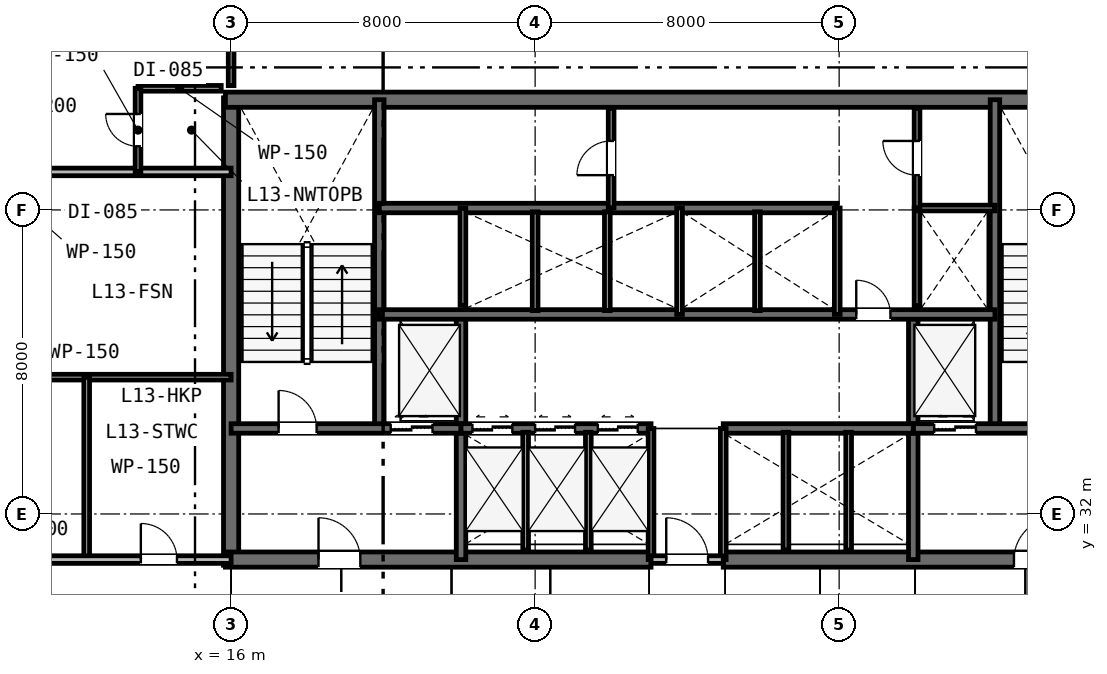
"""IFC4 building model, lengths in metres.
Left out: names, types, materials, properties, quantities, classifications, styles, units other than length and angle.
Written with IfcOpenShell. Run it as: python <this file> out.ifc"""

import sys

from ifc_helpers import new_model, si_unit, direction, frame, frame_2d, origin, place, context, subcontext, project, spatial, rectangle, extrude, element, fill, save


model = new_model("IFC4")
c1 = context("Model", 3, precision=1e-05, world=origin(), true_north=direction((0.0, 1.0)))
c2 = subcontext(c1, "Body", "Model", "MODEL_VIEW")
j1 = project(units=[si_unit("LENGTHUNIT", "METRE"), si_unit("PLANEANGLEUNIT", "RADIAN")], contexts=[c1])
p1 = place(None, origin())
s1 = spatial("IfcSite", under=j1, at=p1, CompositionType="ELEMENT")
p2 = place(p1, origin())
s2 = spatial("IfcBuilding", under=s1, at=p2, CompositionType="ELEMENT")
p3 = place(p2, frame((0.0, 0.0, 54.6)))
s3 = spatial("IfcBuildingStorey", under=s2, at=p3, CompositionType="ELEMENT", Elevation=54.6)
p4 = place(p3, frame((16.0, 30.65, 0.0), z_axis=(0.0, 0.0, 1.0), x_axis=(0.0, 1.0, 0.0)))
e1 = element("IfcWall", 1, at=p4, inside=s3, PredefinedType="SHEAR", context=c2, shape_type="SweptSolid", body=[
    extrude(rectangle(XDim=12.3, YDim=0.4, at=frame_2d((6.15, 0.0))), origin(), (0.0, 0.0, 1.0), 3.6),
])
p5 = place(p3, frame((15.85, 42.9, 0.0), z_axis=(0.0, 0.0, 1.0), x_axis=(1.0, 0.0, 0.0)))
e2 = element("IfcWall", 2, at=p5, inside=s3, PredefinedType="SHEAR", context=c2, shape_type="SweptSolid", body=[
    extrude(rectangle(XDim=24.3, YDim=0.4, at=frame_2d((12.15, 0.0))), origin(), (0.0, 0.0, 1.0), 3.6),
])
p6 = place(p3, frame((15.85, 30.8, 0.0), z_axis=(0.0, 0.0, 1.0), x_axis=(1.0, 0.0, 0.0)))
e3 = element("IfcWall", 3, at=p6, inside=s3, PredefinedType="SHEAR", context=c2, shape_type="SweptSolid", body=[
    extrude(rectangle(XDim=11.2, YDim=0.4, at=frame_2d((5.6, 0.0))), origin(), (0.0, 0.0, 1.0), 3.6),
])
p7 = place(p6, frame((2.45, 0.0, 0.0)))
e4 = element("IfcOpeningElement", 4, at=p7, cuts=e3, PredefinedType="OPENING", context=c2, shape_type="SweptSolid", body=[
    extrude(rectangle(XDim=1.1, YDim=2.15, at=frame_2d((0.55, 1.075))), frame((0.0, 0.21, 0.0), z_axis=(0.0, -1.0, 0.0), x_axis=(1.0, 0.0, 0.0)), (0.0, 0.0, 1.0), 0.42),
])
p8 = place(p3, frame((28.95, 30.8, 0.0), z_axis=(0.0, 0.0, 1.0), x_axis=(1.0, 0.0, 0.0)))
e5 = element("IfcWall", 5, at=p8, inside=s3, PredefinedType="SHEAR", context=c2, shape_type="SweptSolid", body=[
    extrude(rectangle(XDim=11.2, YDim=0.4, at=frame_2d((5.6, 0.0))), origin(), (0.0, 0.0, 1.0), 3.6),
])
p9 = place(p8, frame((7.65, 0.0, 0.0)))
e6 = element("IfcOpeningElement", 6, at=p9, cuts=e5, PredefinedType="OPENING", context=c2, shape_type="SweptSolid", body=[
    extrude(rectangle(XDim=1.1, YDim=2.15, at=frame_2d((0.55, 1.075))), frame((0.0, 0.21, 0.0), z_axis=(0.0, -1.0, 0.0), x_axis=(1.0, 0.0, 0.0)), (0.0, 0.0, 1.0), 0.42),
])
for number, where, z_axis, x_axis in (
    (7, (19.9, 34.25, 0.0), (0.0, 0.0, 1.0), (0.0, 1.0, 0.0)),
    (8, (36.1, 34.25, 0.0), (0.0, 0.0, 1.0), (0.0, 1.0, 0.0)),
):
    element("IfcWall", number, at=place(p3, frame(where, z_axis=z_axis, x_axis=x_axis)), inside=s3, PredefinedType="SHEAR", context=c2, shape_type="SweptSolid", body=[
        extrude(rectangle(XDim=8.65, YDim=0.25, at=frame_2d((4.325, 0.0))), origin(), (0.0, 0.0, 1.0), 3.6),
    ])
for number, where, z_axis, x_axis in (
    (9, (22.05, 30.8, 0.0), (0.0, 0.0, 1.0), (0.0, 1.0, 0.0)),
    (10, (33.95, 30.8, 0.0), (0.0, 0.0, 1.0), (0.0, 1.0, 0.0)),
):
    element("IfcWall", number, at=place(p3, frame(where, z_axis=z_axis, x_axis=x_axis)), inside=s3, PredefinedType="SHEAR", context=c2, shape_type="SweptSolid", body=[
        extrude(rectangle(XDim=6.45, YDim=0.25, at=frame_2d((3.225, 0.0))), origin(), (0.0, 0.0, 1.0), 3.6),
    ])
p10 = place(p3, frame((16.0, 34.25, 0.0), z_axis=(0.0, 0.0, 1.0), x_axis=(1.0, 0.0, 0.0)))
e11 = element("IfcWall", 11, at=p10, inside=s3, PredefinedType="SHEAR", context=c2, shape_type="SweptSolid", body=[
    extrude(rectangle(XDim=6.05, YDim=0.25, at=frame_2d((3.025, 0.0))), origin(), (0.0, 0.0, 1.0), 3.6),
])
p11 = place(p10, frame((1.25, 0.0, 0.0)))
e12 = element("IfcOpeningElement", 12, at=p11, cuts=e11, PredefinedType="OPENING", context=c2, shape_type="SweptSolid", body=[
    extrude(rectangle(XDim=1.0, YDim=2.15, at=frame_2d((0.5, 1.075))), frame((0.0, 0.135, 0.0), z_axis=(0.0, -1.0, 0.0), x_axis=(1.0, 0.0, 0.0)), (0.0, 0.0, 1.0), 0.27),
])
p12 = place(p10, frame((4.2, 0.0, 0.0)))
e13 = element("IfcOpeningElement", 13, at=p12, cuts=e11, PredefinedType="OPENING", context=c2, shape_type="SweptSolid", body=[
    extrude(rectangle(XDim=1.1, YDim=2.15, at=frame_2d((0.55, 1.075))), frame((0.0, 0.135, 0.0), z_axis=(0.0, -1.0, 0.0), x_axis=(1.0, 0.0, 0.0)), (0.0, 0.0, 1.0), 0.27),
])
p13 = place(p3, frame((33.95, 34.25, 0.0), z_axis=(0.0, 0.0, 1.0), x_axis=(1.0, 0.0, 0.0)))
e14 = element("IfcWall", 14, at=p13, inside=s3, PredefinedType="SHEAR", context=c2, shape_type="SweptSolid", body=[
    extrude(rectangle(XDim=6.05, YDim=0.25, at=frame_2d((3.025, 0.0))), origin(), (0.0, 0.0, 1.0), 3.6),
])
p14 = place(p13, frame((3.7, 0.0, 0.0)))
e15 = element("IfcOpeningElement", 15, at=p14, cuts=e14, PredefinedType="OPENING", context=c2, shape_type="SweptSolid", body=[
    extrude(rectangle(XDim=1.0, YDim=2.15, at=frame_2d((0.5, 1.075))), frame((0.0, 0.135, 0.0), z_axis=(0.0, -1.0, 0.0), x_axis=(1.0, 0.0, 0.0)), (0.0, 0.0, 1.0), 0.27),
])
p15 = place(p13, frame((0.55, 0.0, 0.0)))
e16 = element("IfcOpeningElement", 16, at=p15, cuts=e14, PredefinedType="OPENING", context=c2, shape_type="SweptSolid", body=[
    extrude(rectangle(XDim=1.1, YDim=2.15, at=frame_2d((0.55, 1.075))), frame((0.0, 0.135, 0.0), z_axis=(0.0, -1.0, 0.0), x_axis=(1.0, 0.0, 0.0)), (0.0, 0.0, 1.0), 0.27),
])
p16 = place(p3, frame((22.05, 34.25, 0.0), z_axis=(0.0, 0.0, 1.0), x_axis=(1.0, 0.0, 0.0)))
e17 = element("IfcWall", 17, at=p16, inside=s3, PredefinedType="SHEAR", context=c2, shape_type="SweptSolid", body=[
    extrude(rectangle(XDim=5.0, YDim=0.25, at=frame_2d((2.5, 0.0))), origin(), (0.0, 0.0, 1.0), 3.6),
])
p17 = place(p16, frame((0.3, 0.0, 0.0)))
e18 = element("IfcOpeningElement", 18, at=p17, cuts=e17, PredefinedType="OPENING", context=c2, shape_type="SweptSolid", body=[
    extrude(rectangle(XDim=1.05, YDim=2.15, at=frame_2d((0.525, 1.075))), frame((0.0, 0.135, 0.0), z_axis=(0.0, -1.0, 0.0), x_axis=(1.0, 0.0, 0.0)), (0.0, 0.0, 1.0), 0.27),
])
p18 = place(p16, frame((1.95, 0.0, 0.0)))
e19 = element("IfcOpeningElement", 19, at=p18, cuts=e17, PredefinedType="OPENING", context=c2, shape_type="SweptSolid", body=[
    extrude(rectangle(XDim=1.05, YDim=2.15, at=frame_2d((0.525, 1.075))), frame((0.0, 0.135, 0.0), z_axis=(0.0, -1.0, 0.0), x_axis=(1.0, 0.0, 0.0)), (0.0, 0.0, 1.0), 0.27),
])
p19 = place(p16, frame((3.6, 0.0, 0.0)))
e20 = element("IfcOpeningElement", 20, at=p19, cuts=e17, PredefinedType="OPENING", context=c2, shape_type="SweptSolid", body=[
    extrude(rectangle(XDim=1.05, YDim=2.15, at=frame_2d((0.525, 1.075))), frame((0.0, 0.135, 0.0), z_axis=(0.0, -1.0, 0.0), x_axis=(1.0, 0.0, 0.0)), (0.0, 0.0, 1.0), 0.27),
])
p20 = place(p3, frame((28.95, 34.25, 0.0), z_axis=(0.0, 0.0, 1.0), x_axis=(1.0, 0.0, 0.0)))
e21 = element("IfcWall", 21, at=p20, inside=s3, PredefinedType="SHEAR", context=c2, shape_type="SweptSolid", body=[
    extrude(rectangle(XDim=5.0, YDim=0.25, at=frame_2d((2.5, 0.0))), origin(), (0.0, 0.0, 1.0), 3.6),
])
p21 = place(p3, frame((19.9, 37.25, 0.0), z_axis=(0.0, 0.0, 1.0), x_axis=(1.0, 0.0, 0.0)))
e22 = element("IfcWall", 22, at=p21, inside=s3, PredefinedType="SHEAR", context=c2, shape_type="SweptSolid", body=[
    extrude(rectangle(XDim=16.2, YDim=0.25, at=frame_2d((8.1, 0.0))), origin(), (0.0, 0.0, 1.0), 3.6),
])
p22 = place(p21, frame((12.55, 0.0, 0.0)))
e23 = element("IfcOpeningElement", 23, at=p22, cuts=e22, PredefinedType="OPENING", context=c2, shape_type="SweptSolid", body=[
    extrude(rectangle(XDim=0.9, YDim=2.15, at=frame_2d((0.45, 1.075))), frame((0.0, 0.135, 0.0), z_axis=(0.0, -1.0, 0.0), x_axis=(1.0, 0.0, 0.0)), (0.0, 0.0, 1.0), 0.27),
])
p23 = place(p3, frame((19.9, 40.05, 0.0), z_axis=(0.0, 0.0, 1.0), x_axis=(1.0, 0.0, 0.0)))
e24 = element("IfcWall", 24, at=p23, inside=s3, PredefinedType="SHEAR", context=c2, shape_type="SweptSolid", body=[
    extrude(rectangle(XDim=12.05, YDim=0.25, at=frame_2d((6.025, 0.0))), origin(), (0.0, 0.0, 1.0), 3.6),
])
for number, where, z_axis, x_axis in (
    (25, (27.05, 30.8, 0.0), (0.0, 0.0, 1.0), (0.0, 1.0, 0.0)),
    (26, (28.95, 30.8, 0.0), (0.0, 0.0, 1.0), (0.0, 1.0, 0.0)),
):
    element("IfcWall", number, at=place(p3, frame(where, z_axis=z_axis, x_axis=x_axis)), inside=s3, PredefinedType="PLUMBINGWALL", context=c2, shape_type="SweptSolid", body=[
        extrude(rectangle(XDim=3.45, YDim=0.15, at=frame_2d((1.725, 0.0))), origin(), (0.0, 0.0, 1.0), 3.33),
    ])
p24 = place(p3, frame((27.05, 30.8, 0.0), z_axis=(0.0, 0.0, 1.0), x_axis=(1.0, 0.0, 0.0)))
e27 = element("IfcWall", 27, at=p24, inside=s3, PredefinedType="PARTITIONING", context=c2, shape_type="SweptSolid", body=[
    extrude(rectangle(XDim=1.9, YDim=0.2, at=frame_2d((0.95, 0.0))), origin(), (0.0, 0.0, 1.0), 3.33),
])
p25 = place(p24, frame((0.4, 0.0, 0.0)))
e28 = element("IfcOpeningElement", 28, at=p25, cuts=e27, PredefinedType="OPENING", context=c2, shape_type="SweptSolid", body=[
    extrude(rectangle(XDim=1.1, YDim=2.15, at=frame_2d((0.55, 1.075))), frame((0.0, 0.11, 0.0), z_axis=(0.0, -1.0, 0.0), x_axis=(1.0, 0.0, 0.0)), (0.0, 0.0, 1.0), 0.22),
])
for number, where, z_axis, x_axis in (
    (29, (23.75, 31.05, 0.0), (0.0, 0.0, 1.0), (0.0, 1.0, 0.0)),
    (30, (25.4, 31.05, 0.0), (0.0, 0.0, 1.0), (0.0, 1.0, 0.0)),
    (31, (30.6, 31.05, 0.0), (0.0, 0.0, 1.0), (0.0, 1.0, 0.0)),
    (32, (32.25, 31.05, 0.0), (0.0, 0.0, 1.0), (0.0, 1.0, 0.0)),
):
    element("IfcWall", number, at=place(p3, frame(where, z_axis=z_axis, x_axis=x_axis)), inside=s3, PredefinedType="PLUMBINGWALL", context=c2, shape_type="SweptSolid", body=[
        extrude(rectangle(XDim=3.1, YDim=0.15, at=frame_2d((1.55, 0.0))), origin(), (0.0, 0.0, 1.0), 3.33),
    ])
p26 = place(p3, frame((22.1, 37.49, 0.0), z_axis=(0.0, 0.0, 1.0), x_axis=(0.0, 1.0, 0.0)))
e33 = element("IfcWall", 33, at=p26, inside=s3, PredefinedType="PLUMBINGWALL", context=c2, shape_type="SweptSolid", body=[
    extrude(rectangle(XDim=2.56, YDim=0.15, at=frame_2d((1.28, 0.0))), origin(), (0.0, 0.0, 1.0), 3.33),
])
p27 = place(p3, frame((27.8, 37.25, 0.0), z_axis=(0.0, 0.0, 1.0), x_axis=(0.0, 1.0, 0.0)))
e34 = element("IfcWall", 34, at=p27, inside=s3, PredefinedType="PLUMBINGWALL", context=c2, shape_type="SweptSolid", body=[
    extrude(rectangle(XDim=2.8, YDim=0.15, at=frame_2d((1.4, 0.0))), origin(), (0.0, 0.0, 1.0), 3.33),
])
for number, where, z_axis, x_axis in (
    (35, (24.0, 37.35, 0.0), (0.0, 0.0, 1.0), (0.0, 1.0, 0.0)),
    (36, (25.9, 37.35, 0.0), (0.0, 0.0, 1.0), (0.0, 1.0, 0.0)),
):
    element("IfcWall", number, at=place(p3, frame(where, z_axis=z_axis, x_axis=x_axis)), inside=s3, PredefinedType="PLUMBINGWALL", context=c2, shape_type="SweptSolid", body=[
        extrude(rectangle(XDim=2.6, YDim=0.15, at=frame_2d((1.3, 0.0))), origin(), (0.0, 0.0, 1.0), 3.33),
    ])
p28 = place(p3, frame((31.95, 37.25, 0.0), z_axis=(0.0, 0.0, 1.0), x_axis=(0.0, 1.0, 0.0)))
e37 = element("IfcWall", 37, at=p28, inside=s3, PredefinedType="PLUMBINGWALL", context=c2, shape_type="SweptSolid", body=[
    extrude(rectangle(XDim=2.8, YDim=0.15, at=frame_2d((1.4, 0.0))), origin(), (0.0, 0.0, 1.0), 3.33),
])
p29 = place(p3, frame((29.85, 37.35, 0.0), z_axis=(0.0, 0.0, 1.0), x_axis=(0.0, 1.0, 0.0)))
e38 = element("IfcWall", 38, at=p29, inside=s3, PredefinedType="PLUMBINGWALL", context=c2, shape_type="SweptSolid", body=[
    extrude(rectangle(XDim=2.6, YDim=0.15, at=frame_2d((1.3, 0.0))), origin(), (0.0, 0.0, 1.0), 3.33),
])
p30 = place(p3, frame((34.05, 37.473, 0.0), z_axis=(0.0, 0.0, 1.0), x_axis=(0.0, 1.0, 0.0)))
e39 = element("IfcWall", 39, at=p30, inside=s3, PredefinedType="PLUMBINGWALL", context=c2, shape_type="SweptSolid", body=[
    extrude(rectangle(XDim=2.577, YDim=0.15, at=frame_2d((1.288, 0.0))), origin(), (0.0, 0.0, 1.0), 3.33),
])
p31 = place(p3, frame((34.05, 40.05, 0.0), z_axis=(0.0, 0.0, 1.0), x_axis=(1.0, 0.0, 0.0)))
e40 = element("IfcWall", 40, at=p31, inside=s3, PredefinedType="PARTITIONING", context=c2, shape_type="SweptSolid", body=[
    extrude(rectangle(XDim=2.05, YDim=0.15, at=frame_2d((1.025, 0.0))), origin(), (0.0, 0.0, 1.0), 3.33),
])
p32 = place(p3, frame((34.05, 40.05, 0.0), z_axis=(0.0, 0.0, 1.0), x_axis=(0.0, 1.0, 0.0)))
e41 = element("IfcWall", 41, at=p32, inside=s3, PredefinedType="PARTITIONING", context=c2, shape_type="SweptSolid", body=[
    extrude(rectangle(XDim=2.63, YDim=0.15, at=frame_2d((1.315, 0.0))), origin(), (0.0, 0.0, 1.0), 3.33),
])
p33 = place(p32, frame((0.865, 0.0, 0.0)))
e42 = element("IfcOpeningElement", 42, at=p33, cuts=e41, PredefinedType="OPENING", context=c2, shape_type="SweptSolid", body=[
    extrude(rectangle(XDim=0.9, YDim=2.15, at=frame_2d((0.45, 1.075))), frame((0.0, 0.085, 0.0), z_axis=(0.0, -1.0, 0.0), x_axis=(1.0, 0.0, 0.0)), (0.0, 0.0, 1.0), 0.17),
])
p34 = place(p3, frame((26.0, 40.05, 0.0), z_axis=(0.0, 0.0, 1.0), x_axis=(0.0, 1.0, 0.0)))
e43 = element("IfcWall", 43, at=p34, inside=s3, PredefinedType="PARTITIONING", context=c2, shape_type="SweptSolid", body=[
    extrude(rectangle(XDim=2.63, YDim=0.15, at=frame_2d((1.315, 0.0))), origin(), (0.0, 0.0, 1.0), 3.33),
])
p35 = place(p34, frame((0.865, 0.0, 0.0)))
e44 = element("IfcOpeningElement", 44, at=p35, cuts=e43, PredefinedType="OPENING", context=c2, shape_type="SweptSolid", body=[
    extrude(rectangle(XDim=0.9, YDim=2.15, at=frame_2d((0.45, 1.075))), frame((0.0, 0.085, 0.0), z_axis=(0.0, -1.0, 0.0), x_axis=(1.0, 0.0, 0.0)), (0.0, 0.0, 1.0), 0.17),
])
p36 = place(p3, frame((8.3, 35.6, 0.0), z_axis=(0.0, 0.0, 1.0), x_axis=(1.0, 0.0, 0.0)))
e45 = element("IfcWall", 45, at=p36, inside=s3, PredefinedType="PARTITIONING", context=c2, shape_type="SweptSolid", body=[
    extrude(rectangle(XDim=7.7, YDim=0.15, at=frame_2d((3.85, 0.0))), origin(), (0.0, 0.0, 1.0), 2.82),
])
p37 = place(p3, frame((12.2, 30.8, 0.0), z_axis=(0.0, 0.0, 1.0), x_axis=(0.0, 1.0, 0.0)))
e46 = element("IfcWall", 46, at=p37, inside=s3, PredefinedType="PARTITIONING", context=c2, shape_type="SweptSolid", body=[
    extrude(rectangle(XDim=4.8, YDim=0.15, at=frame_2d((2.4, 0.0))), origin(), (0.0, 0.0, 1.0), 2.82),
])
p38 = place(p3, frame((8.3, 30.8, 0.0), z_axis=(0.0, 0.0, 1.0), x_axis=(1.0, 0.0, 0.0)))
e47 = element("IfcWall", 47, at=p38, inside=s3, PredefinedType="PARTITIONING", context=c2, shape_type="SweptSolid", body=[
    extrude(rectangle(XDim=7.7, YDim=0.2, at=frame_2d((3.85, 0.0))), origin(), (0.0, 0.0, 1.0), 2.82),
])
p39 = place(p38, frame((5.325, 0.0, 0.0)))
e48 = element("IfcOpeningElement", 48, at=p39, cuts=e47, PredefinedType="OPENING", context=c2, shape_type="SweptSolid", body=[
    extrude(rectangle(XDim=0.95, YDim=2.15, at=frame_2d((0.475, 1.075))), frame((0.0, 0.11, 0.0), z_axis=(0.0, -1.0, 0.0), x_axis=(1.0, 0.0, 0.0)), (0.0, 0.0, 1.0), 0.22),
])
p40 = place(p3, frame((0.1, 41.0, 0.0), z_axis=(0.0, 0.0, 1.0), x_axis=(1.0, 0.0, 0.0)))
e49 = element("IfcWall", 49, at=p40, inside=s3, PredefinedType="PARTITIONING", context=c2, shape_type="SweptSolid", body=[
    extrude(rectangle(XDim=15.9, YDim=0.2, at=frame_2d((7.95, 0.0))), origin(), (0.0, 0.0, 1.0), 2.82),
])
p41 = place(p40, frame((6.779, 0.0, 0.0)))
e50 = element("IfcOpeningElement", 50, at=p41, cuts=e49, PredefinedType="OPENING", context=c2, shape_type="SweptSolid", body=[
    extrude(rectangle(XDim=0.95, YDim=2.15, at=frame_2d((0.475, 1.075))), frame((0.0, 0.11, 0.0), z_axis=(0.0, -1.0, 0.0), x_axis=(1.0, 0.0, 0.0)), (0.0, 0.0, 1.0), 0.22),
])
p42 = place(p3, frame((13.55, 43.2, 0.0), z_axis=(0.0, 0.0, 1.0), x_axis=(1.0, 0.0, 0.0)))
e51 = element("IfcWall", 51, at=p42, inside=s3, PredefinedType="PARTITIONING", context=c2, shape_type="SweptSolid", body=[
    extrude(rectangle(XDim=2.19, YDim=0.15, at=frame_2d((1.095, 0.0))), origin(), (0.0, 0.0, 1.0), 3.33),
])
p43 = place(p3, frame((13.55, 41.0, 0.0), z_axis=(0.0, 0.0, 1.0), x_axis=(0.0, 1.0, 0.0)))
e52 = element("IfcWall", 52, at=p43, inside=s3, PredefinedType="PARTITIONING", context=c2, shape_type="SweptSolid", body=[
    extrude(rectangle(XDim=2.2, YDim=0.15, at=frame_2d((1.1, 0.0))), origin(), (0.0, 0.0, 1.0), 3.33),
])
p44 = place(p43, frame((0.675, 0.0, 0.0)))
e53 = element("IfcOpeningElement", 53, at=p44, cuts=e52, PredefinedType="OPENING", context=c2, shape_type="SweptSolid", body=[
    extrude(rectangle(XDim=0.85, YDim=2.15, at=frame_2d((0.425, 1.075))), frame((0.0, 0.085, 0.0), z_axis=(0.0, -1.0, 0.0), x_axis=(1.0, 0.0, 0.0)), (0.0, 0.0, 1.0), 0.17),
])
p45 = place(p3, frame((16.0, 43.27, 0.0), z_axis=(0.0, 0.0, 1.0), x_axis=(0.0, 1.0, 0.0)))
e54 = element("IfcWall", 54, at=p45, inside=s3, PredefinedType="PARTITIONING", context=c2, shape_type="SweptSolid", body=[
    extrude(rectangle(XDim=4.63, YDim=0.15, at=frame_2d((2.315, 0.0))), origin(), (0.0, 0.0, 1.0), 2.93),
])
p46 = place(p25, origin())
e55 = element("IfcDoor", 55, at=p46, inside=s3, OperationType="SINGLE_SWING_LEFT", PredefinedType="DOOR", context=c2, shape_type="SweptSolid", body=[
    extrude(rectangle(XDim=1.1, YDim=2.15, at=frame_2d((0.55, 1.075))), frame((0.0, 0.025, 0.0), z_axis=(0.0, -1.0, 0.0), x_axis=(1.0, 0.0, 0.0)), (0.0, 0.0, 1.0), 0.05),
])
fill(e28, e55)
p47 = place(p11, origin())
e56 = element("IfcDoor", 56, at=p47, inside=s3, OperationType="SINGLE_SWING_LEFT", PredefinedType="DOOR", context=c2, shape_type="SweptSolid", body=[
    extrude(rectangle(XDim=1.0, YDim=2.15, at=frame_2d((0.5, 1.075))), frame((0.0, 0.025, 0.0), z_axis=(0.0, -1.0, 0.0), x_axis=(1.0, 0.0, 0.0)), (0.0, 0.0, 1.0), 0.05),
])
fill(e12, e56)
p48 = place(p7, origin())
e57 = element("IfcDoor", 57, at=p48, inside=s3, OperationType="SINGLE_SWING_LEFT", PredefinedType="DOOR", context=c2, shape_type="SweptSolid", body=[
    extrude(rectangle(XDim=1.1, YDim=2.15, at=frame_2d((0.55, 1.075))), frame((0.0, 0.025, 0.0), z_axis=(0.0, -1.0, 0.0), x_axis=(1.0, 0.0, 0.0)), (0.0, 0.0, 1.0), 0.05),
])
fill(e4, e57)
p49 = place(p9, origin())
e58 = element("IfcDoor", 58, at=p49, inside=s3, OperationType="SINGLE_SWING_RIGHT", PredefinedType="DOOR", context=c2, shape_type="SweptSolid", body=[
    extrude(rectangle(XDim=1.1, YDim=2.15, at=frame_2d((0.55, 1.075))), frame((0.0, 0.025, 0.0), z_axis=(0.0, -1.0, 0.0), x_axis=(1.0, 0.0, 0.0)), (0.0, 0.0, 1.0), 0.05),
])
fill(e6, e58)
p50 = place(p22, origin())
e59 = element("IfcDoor", 59, at=p50, inside=s3, OperationType="SINGLE_SWING_LEFT", PredefinedType="DOOR", context=c2, shape_type="SweptSolid", body=[
    extrude(rectangle(XDim=0.9, YDim=2.15, at=frame_2d((0.45, 1.075))), frame((0.0, 0.025, 0.0), z_axis=(0.0, -1.0, 0.0), x_axis=(1.0, 0.0, 0.0)), (0.0, 0.0, 1.0), 0.05),
])
fill(e23, e59)
p51 = place(p33, origin())
e60 = element("IfcDoor", 60, at=p51, inside=s3, OperationType="SINGLE_SWING_RIGHT", PredefinedType="DOOR", context=c2, shape_type="SweptSolid", body=[
    extrude(rectangle(XDim=0.9, YDim=2.15, at=frame_2d((0.45, 1.075))), frame((0.0, 0.025, 0.0), z_axis=(0.0, -1.0, 0.0), x_axis=(1.0, 0.0, 0.0)), (0.0, 0.0, 1.0), 0.05),
])
fill(e42, e60)
p52 = place(p35, origin())
e61 = element("IfcDoor", 61, at=p52, inside=s3, OperationType="SINGLE_SWING_LEFT", PredefinedType="DOOR", context=c2, shape_type="SweptSolid", body=[
    extrude(rectangle(XDim=0.9, YDim=2.15, at=frame_2d((0.45, 1.075))), frame((0.0, 0.025, 0.0), z_axis=(0.0, -1.0, 0.0), x_axis=(1.0, 0.0, 0.0)), (0.0, 0.0, 1.0), 0.05),
])
fill(e44, e61)
p53 = place(p39, origin())
e62 = element("IfcDoor", 62, at=p53, inside=s3, OperationType="SINGLE_SWING_LEFT", PredefinedType="DOOR", context=c2, shape_type="SweptSolid", body=[
    extrude(rectangle(XDim=0.95, YDim=2.15, at=frame_2d((0.475, 1.075))), frame((0.0, 0.025, 0.0), z_axis=(0.0, -1.0, 0.0), x_axis=(1.0, 0.0, 0.0)), (0.0, 0.0, 1.0), 0.05),
])
fill(e48, e62)
p54 = place(p44, origin())
e63 = element("IfcDoor", 63, at=p54, inside=s3, OperationType="SINGLE_SWING_RIGHT", PredefinedType="DOOR", context=c2, shape_type="SweptSolid", body=[
    extrude(rectangle(XDim=0.85, YDim=2.15, at=frame_2d((0.425, 1.075))), frame((0.0, 0.025, 0.0), z_axis=(0.0, -1.0, 0.0), x_axis=(1.0, 0.0, 0.0)), (0.0, 0.0, 1.0), 0.05),
])
fill(e53, e63)
p55 = place(p12, origin())
e64 = element("IfcDoor", 64, at=p55, inside=s3, OperationType="DOUBLE_DOOR_SLIDING", PredefinedType="DOOR", context=c2, shape_type="SweptSolid", body=[
    extrude(rectangle(XDim=1.1, YDim=2.15, at=frame_2d((0.55, 1.075))), frame((0.0, 0.025, 0.0), z_axis=(0.0, -1.0, 0.0), x_axis=(1.0, 0.0, 0.0)), (0.0, 0.0, 1.0), 0.05),
])
fill(e13, e64)
p56 = place(p15, origin())
e65 = element("IfcDoor", 65, at=p56, inside=s3, OperationType="DOUBLE_DOOR_SLIDING", PredefinedType="DOOR", context=c2, shape_type="SweptSolid", body=[
    extrude(rectangle(XDim=1.1, YDim=2.15, at=frame_2d((0.55, 1.075))), frame((0.0, 0.025, 0.0), z_axis=(0.0, -1.0, 0.0), x_axis=(1.0, 0.0, 0.0)), (0.0, 0.0, 1.0), 0.05),
])
fill(e16, e65)
p57 = place(p17, origin())
e66 = element("IfcDoor", 66, at=p57, inside=s3, OperationType="DOUBLE_DOOR_SLIDING", PredefinedType="DOOR", context=c2, shape_type="SweptSolid", body=[
    extrude(rectangle(XDim=1.05, YDim=2.15, at=frame_2d((0.525, 1.075))), frame((0.0, 0.025, 0.0), z_axis=(0.0, -1.0, 0.0), x_axis=(1.0, 0.0, 0.0)), (0.0, 0.0, 1.0), 0.05),
])
fill(e18, e66)
p58 = place(p18, origin())
e67 = element("IfcDoor", 67, at=p58, inside=s3, OperationType="DOUBLE_DOOR_SLIDING", PredefinedType="DOOR", context=c2, shape_type="SweptSolid", body=[
    extrude(rectangle(XDim=1.05, YDim=2.15, at=frame_2d((0.525, 1.075))), frame((0.0, 0.025, 0.0), z_axis=(0.0, -1.0, 0.0), x_axis=(1.0, 0.0, 0.0)), (0.0, 0.0, 1.0), 0.05),
])
fill(e19, e67)
p59 = place(p19, origin())
e68 = element("IfcDoor", 68, at=p59, inside=s3, OperationType="DOUBLE_DOOR_SLIDING", PredefinedType="DOOR", context=c2, shape_type="SweptSolid", body=[
    extrude(rectangle(XDim=1.05, YDim=2.15, at=frame_2d((0.525, 1.075))), frame((0.0, 0.025, 0.0), z_axis=(0.0, -1.0, 0.0), x_axis=(1.0, 0.0, 0.0)), (0.0, 0.0, 1.0), 0.05),
])
fill(e20, e68)
save(model, sys.argv[1])
